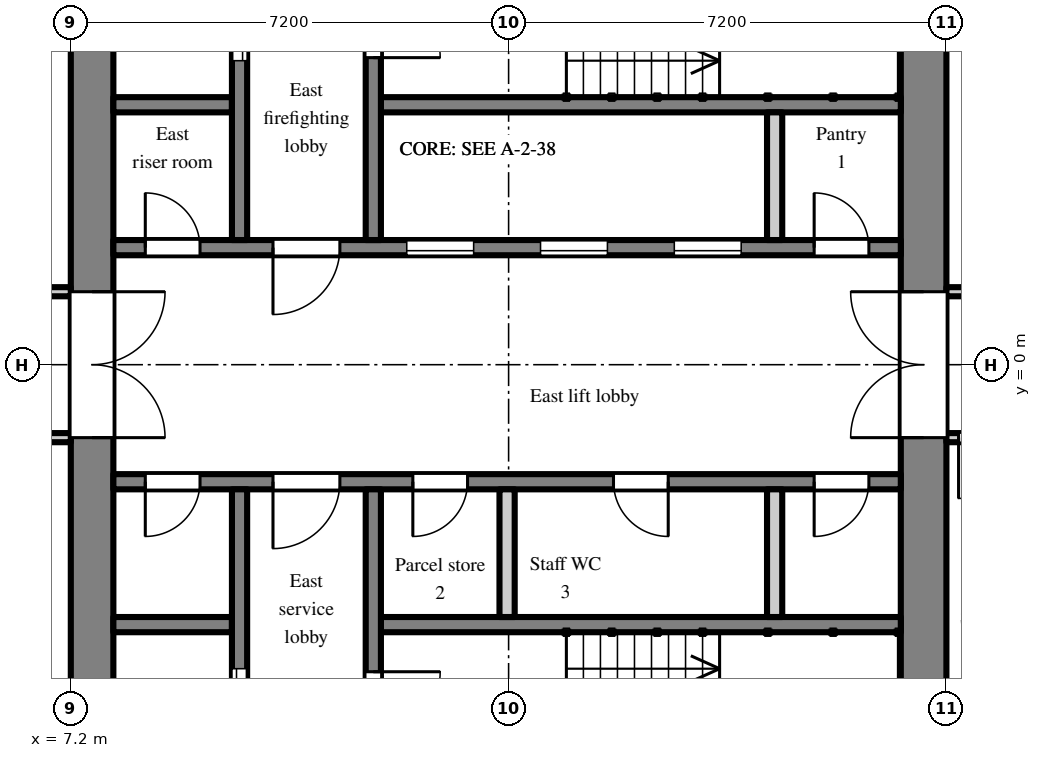
"""IFC4 building model, lengths in metres.
Left out: names, types, materials, properties, quantities, classifications, styles, units other than length and angle.
Written with IfcOpenShell. Run it as: python <this file> out.ifc"""

import sys

from ifc_helpers import new_model, si_unit, direction, frame, frame_2d, origin, place, context, subcontext, project, spatial, rectangle, extrude, element, fill, save


model = new_model("IFC4")
c1 = context("Model", 3, precision=1e-05, world=origin(), true_north=direction((0.0, 1.0)))
c2 = subcontext(c1, "Body", "Model", "MODEL_VIEW")
j1 = project(units=[si_unit("LENGTHUNIT", "METRE"), si_unit("PLANEANGLEUNIT", "RADIAN")], contexts=[c1])
p1 = place(None, origin())
s1 = spatial("IfcSite", under=j1, at=p1, CompositionType="ELEMENT")
p2 = place(p1, origin())
s2 = spatial("IfcBuilding", under=s1, at=p2, CompositionType="ELEMENT")
p3 = place(p2, frame((0.0, 0.0, 231.9)))
s3 = spatial("IfcBuildingStorey", under=s2, at=p3, CompositionType="ELEMENT", Elevation=231.9)
p4 = place(p3, frame((7.55, -7.2, 0.0), z_axis=(0.0, 0.0, 1.0), x_axis=(0.0, 1.0, 0.0)))
e1 = element("IfcWall", 1, at=p4, inside=s3, PredefinedType="SHEAR", context=c2, shape_type="SweptSolid", body=[
    extrude(rectangle(XDim=14.4, YDim=0.7, at=frame_2d((7.2, 0.0))), origin(), (0.0, 0.0, 1.0), 2.6),
])
p5 = place(p4, frame((6.0, 0.0, 0.0)))
e2 = element("IfcOpeningElement", 2, at=p5, cuts=e1, PredefinedType="OPENING", context=c2, shape_type="SweptSolid", body=[
    extrude(rectangle(XDim=2.4, YDim=2.2, at=frame_2d((1.2, 1.1))), frame((0.0, 0.36, 0.0), z_axis=(0.0, -1.0, 0.0), x_axis=(1.0, 0.0, 0.0)), (0.0, 0.0, 1.0), 0.72),
])
p6 = place(p3, frame((21.225, -7.2, 0.0), z_axis=(0.0, 0.0, 1.0), x_axis=(0.0, 1.0, 0.0)))
e3 = element("IfcWall", 3, at=p6, inside=s3, PredefinedType="SHEAR", context=c2, shape_type="SweptSolid", body=[
    extrude(rectangle(XDim=14.4, YDim=0.75, at=frame_2d((7.2, 0.0))), origin(), (0.0, 0.0, 1.0), 2.6),
])
p7 = place(p6, frame((6.0, 0.0, 0.0)))
e4 = element("IfcOpeningElement", 4, at=p7, cuts=e3, PredefinedType="OPENING", context=c2, shape_type="SweptSolid", body=[
    extrude(rectangle(XDim=2.4, YDim=2.2, at=frame_2d((1.2, 1.1))), frame((0.0, 0.385, 0.0), z_axis=(0.0, -1.0, 0.0), x_axis=(1.0, 0.0, 0.0)), (0.0, 0.0, 1.0), 0.77),
])
p8 = place(p3, frame((7.9, 1.925, 0.0), z_axis=(0.0, 0.0, 1.0), x_axis=(1.0, 0.0, 0.0)))
e5 = element("IfcWall", 5, at=p8, inside=s3, PredefinedType="SHEAR", context=c2, shape_type="SweptSolid", body=[
    extrude(rectangle(XDim=12.95, YDim=0.25, at=frame_2d((6.475, 0.0))), origin(), (0.0, 0.0, 1.0), 2.6),
])
p9 = place(p8, frame((4.825, 0.0, 0.0)))
e6 = element("IfcOpeningElement", 6, at=p9, cuts=e5, PredefinedType="OPENING", context=c2, shape_type="SweptSolid", body=[
    extrude(rectangle(XDim=1.1, YDim=2.1, at=frame_2d((0.55, 1.05))), frame((0.0, 0.135, 0.0), z_axis=(0.0, -1.0, 0.0), x_axis=(1.0, 0.0, 0.0)), (0.0, 0.0, 1.0), 0.27),
])
p10 = place(p8, frame((7.025, 0.0, 0.0)))
e7 = element("IfcOpeningElement", 7, at=p10, cuts=e5, PredefinedType="OPENING", context=c2, shape_type="SweptSolid", body=[
    extrude(rectangle(XDim=1.1, YDim=2.1, at=frame_2d((0.55, 1.05))), frame((0.0, 0.135, 0.0), z_axis=(0.0, -1.0, 0.0), x_axis=(1.0, 0.0, 0.0)), (0.0, 0.0, 1.0), 0.27),
])
p11 = place(p8, frame((9.225, 0.0, 0.0)))
e8 = element("IfcOpeningElement", 8, at=p11, cuts=e5, PredefinedType="OPENING", context=c2, shape_type="SweptSolid", body=[
    extrude(rectangle(XDim=1.1, YDim=2.1, at=frame_2d((0.55, 1.05))), frame((0.0, 0.135, 0.0), z_axis=(0.0, -1.0, 0.0), x_axis=(1.0, 0.0, 0.0)), (0.0, 0.0, 1.0), 0.27),
])
p12 = place(p8, frame((0.525, 0.0, 0.0)))
e9 = element("IfcOpeningElement", 9, at=p12, cuts=e5, PredefinedType="OPENING", context=c2, shape_type="SweptSolid", body=[
    extrude(rectangle(XDim=0.9, YDim=2.1, at=frame_2d((0.45, 1.05))), frame((0.0, 0.135, 0.0), z_axis=(0.0, -1.0, 0.0), x_axis=(1.0, 0.0, 0.0)), (0.0, 0.0, 1.0), 0.27),
])
p13 = place(p8, frame((2.625, 0.0, 0.0)))
e10 = element("IfcOpeningElement", 10, at=p13, cuts=e5, PredefinedType="OPENING", context=c2, shape_type="SweptSolid", body=[
    extrude(rectangle(XDim=1.1, YDim=2.1, at=frame_2d((0.55, 1.05))), frame((0.0, 0.135, 0.0), z_axis=(0.0, -1.0, 0.0), x_axis=(1.0, 0.0, 0.0)), (0.0, 0.0, 1.0), 0.27),
])
p14 = place(p8, frame((11.525, 0.0, 0.0)))
e11 = element("IfcOpeningElement", 11, at=p14, cuts=e5, PredefinedType="OPENING", context=c2, shape_type="SweptSolid", body=[
    extrude(rectangle(XDim=0.9, YDim=2.1, at=frame_2d((0.45, 1.05))), frame((0.0, 0.135, 0.0), z_axis=(0.0, -1.0, 0.0), x_axis=(1.0, 0.0, 0.0)), (0.0, 0.0, 1.0), 0.27),
])
p15 = place(p3, frame((7.9, 4.275, 0.0), z_axis=(0.0, 0.0, 1.0), x_axis=(1.0, 0.0, 0.0)))
e12 = element("IfcWall", 12, at=p15, inside=s3, PredefinedType="SHEAR", context=c2, shape_type="SweptSolid", body=[
    extrude(rectangle(XDim=1.95, YDim=0.25, at=frame_2d((0.975, 0.0))), origin(), (0.0, 0.0, 1.0), 2.6),
])
p16 = place(p3, frame((12.3, 4.275, 0.0), z_axis=(0.0, 0.0, 1.0), x_axis=(1.0, 0.0, 0.0)))
e13 = element("IfcWall", 13, at=p16, inside=s3, PredefinedType="SHEAR", context=c2, shape_type="SweptSolid", body=[
    extrude(rectangle(XDim=8.55, YDim=0.25, at=frame_2d((4.275, 0.0))), origin(), (0.0, 0.0, 1.0), 2.6),
])
p17 = place(p3, frame((9.975, 2.05, 0.0), z_axis=(0.0, 0.0, 1.0), x_axis=(0.0, 1.0, 0.0)))
e14 = element("IfcWall", 14, at=p17, inside=s3, PredefinedType="SHEAR", context=c2, shape_type="SweptSolid", body=[
    extrude(rectangle(XDim=4.75, YDim=0.25, at=frame_2d((2.375, 0.0))), origin(), (0.0, 0.0, 1.0), 2.6),
])
p18 = place(p17, frame((2.95, 0.0, 0.0)))
e15 = element("IfcOpeningElement", 15, at=p18, cuts=e14, PredefinedType="OPENING", context=c2, shape_type="SweptSolid", body=[
    extrude(rectangle(XDim=1.1, YDim=2.1, at=frame_2d((0.55, 1.05))), frame((0.0, 0.135, 0.0), z_axis=(0.0, -1.0, 0.0), x_axis=(1.0, 0.0, 0.0)), (0.0, 0.0, 1.0), 0.27),
])
p19 = place(p3, frame((12.175, 2.05, 0.0), z_axis=(0.0, 0.0, 1.0), x_axis=(0.0, 1.0, 0.0)))
e16 = element("IfcWall", 16, at=p19, inside=s3, PredefinedType="SHEAR", context=c2, shape_type="SweptSolid", body=[
    extrude(rectangle(XDim=4.75, YDim=0.25, at=frame_2d((2.375, 0.0))), origin(), (0.0, 0.0, 1.0), 2.6),
])
p20 = place(p19, frame((3.0, 0.0, 0.0)))
e17 = element("IfcOpeningElement", 17, at=p20, cuts=e16, PredefinedType="OPENING", context=c2, shape_type="SweptSolid", body=[
    extrude(rectangle(XDim=1.1, YDim=2.1, at=frame_2d((0.55, 1.05))), frame((0.0, 0.135, 0.0), z_axis=(0.0, -1.0, 0.0), x_axis=(1.0, 0.0, 0.0)), (0.0, 0.0, 1.0), 0.27),
])
p21 = place(p3, frame((18.775, 2.05, 0.0), z_axis=(0.0, 0.0, 1.0), x_axis=(0.0, 1.0, 0.0)))
e18 = element("IfcWall", 18, at=p21, inside=s3, PredefinedType="PARTITIONING", context=c2, shape_type="SweptSolid", body=[
    extrude(rectangle(XDim=2.1, YDim=0.25, at=frame_2d((1.05, 0.0))), origin(), (0.0, 0.0, 1.0), 2.6),
])
p22 = place(p3, frame((7.9, -1.925, 0.0), z_axis=(0.0, 0.0, 1.0), x_axis=(1.0, 0.0, 0.0)))
e19 = element("IfcWall", 19, at=p22, inside=s3, PredefinedType="SHEAR", context=c2, shape_type="SweptSolid", body=[
    extrude(rectangle(XDim=12.95, YDim=0.25, at=frame_2d((6.475, 0.0))), origin(), (0.0, 0.0, 1.0), 2.6),
])
p23 = place(p22, frame((0.525, 0.0, 0.0)))
e20 = element("IfcOpeningElement", 20, at=p23, cuts=e19, PredefinedType="OPENING", context=c2, shape_type="SweptSolid", body=[
    extrude(rectangle(XDim=0.9, YDim=2.1, at=frame_2d((0.45, 1.05))), frame((0.0, 0.135, 0.0), z_axis=(0.0, -1.0, 0.0), x_axis=(1.0, 0.0, 0.0)), (0.0, 0.0, 1.0), 0.27),
])
p24 = place(p22, frame((2.625, 0.0, 0.0)))
e21 = element("IfcOpeningElement", 21, at=p24, cuts=e19, PredefinedType="OPENING", context=c2, shape_type="SweptSolid", body=[
    extrude(rectangle(XDim=1.1, YDim=2.1, at=frame_2d((0.55, 1.05))), frame((0.0, 0.135, 0.0), z_axis=(0.0, -1.0, 0.0), x_axis=(1.0, 0.0, 0.0)), (0.0, 0.0, 1.0), 0.27),
])
p25 = place(p22, frame((4.925, 0.0, 0.0)))
e22 = element("IfcOpeningElement", 22, at=p25, cuts=e19, PredefinedType="OPENING", context=c2, shape_type="SweptSolid", body=[
    extrude(rectangle(XDim=0.9, YDim=2.1, at=frame_2d((0.45, 1.05))), frame((0.0, 0.135, 0.0), z_axis=(0.0, -1.0, 0.0), x_axis=(1.0, 0.0, 0.0)), (0.0, 0.0, 1.0), 0.27),
])
p26 = place(p22, frame((8.225, 0.0, 0.0)))
e23 = element("IfcOpeningElement", 23, at=p26, cuts=e19, PredefinedType="OPENING", context=c2, shape_type="SweptSolid", body=[
    extrude(rectangle(XDim=0.9, YDim=2.1, at=frame_2d((0.45, 1.05))), frame((0.0, 0.135, 0.0), z_axis=(0.0, -1.0, 0.0), x_axis=(1.0, 0.0, 0.0)), (0.0, 0.0, 1.0), 0.27),
])
p27 = place(p22, frame((11.525, 0.0, 0.0)))
e24 = element("IfcOpeningElement", 24, at=p27, cuts=e19, PredefinedType="OPENING", context=c2, shape_type="SweptSolid", body=[
    extrude(rectangle(XDim=0.9, YDim=2.1, at=frame_2d((0.45, 1.05))), frame((0.0, 0.135, 0.0), z_axis=(0.0, -1.0, 0.0), x_axis=(1.0, 0.0, 0.0)), (0.0, 0.0, 1.0), 0.27),
])
p28 = place(p3, frame((7.9, -4.275, 0.0), z_axis=(0.0, 0.0, 1.0), x_axis=(1.0, 0.0, 0.0)))
e25 = element("IfcWall", 25, at=p28, inside=s3, PredefinedType="SHEAR", context=c2, shape_type="SweptSolid", body=[
    extrude(rectangle(XDim=1.95, YDim=0.25, at=frame_2d((0.975, 0.0))), origin(), (0.0, 0.0, 1.0), 2.6),
])
p29 = place(p3, frame((12.3, -4.275, 0.0), z_axis=(0.0, 0.0, 1.0), x_axis=(1.0, 0.0, 0.0)))
e26 = element("IfcWall", 26, at=p29, inside=s3, PredefinedType="SHEAR", context=c2, shape_type="SweptSolid", body=[
    extrude(rectangle(XDim=8.55, YDim=0.25, at=frame_2d((4.275, 0.0))), origin(), (0.0, 0.0, 1.0), 2.6),
])
p30 = place(p3, frame((9.975, -2.05, 0.0), z_axis=(0.0, 0.0, 1.0), x_axis=(0.0, -1.0, 0.0)))
e27 = element("IfcWall", 27, at=p30, inside=s3, PredefinedType="SHEAR", context=c2, shape_type="SweptSolid", body=[
    extrude(rectangle(XDim=4.75, YDim=0.25, at=frame_2d((2.375, 0.0))), origin(), (0.0, 0.0, 1.0), 2.6),
])
p31 = place(p30, frame((2.95, 0.0, 0.0)))
e28 = element("IfcOpeningElement", 28, at=p31, cuts=e27, PredefinedType="OPENING", context=c2, shape_type="SweptSolid", body=[
    extrude(rectangle(XDim=1.1, YDim=2.1, at=frame_2d((0.55, 1.05))), frame((0.0, 0.135, 0.0), z_axis=(0.0, -1.0, 0.0), x_axis=(1.0, 0.0, 0.0)), (0.0, 0.0, 1.0), 0.27),
])
p32 = place(p3, frame((12.175, -2.05, 0.0), z_axis=(0.0, 0.0, 1.0), x_axis=(0.0, -1.0, 0.0)))
e29 = element("IfcWall", 29, at=p32, inside=s3, PredefinedType="SHEAR", context=c2, shape_type="SweptSolid", body=[
    extrude(rectangle(XDim=4.75, YDim=0.25, at=frame_2d((2.375, 0.0))), origin(), (0.0, 0.0, 1.0), 2.6),
])
p33 = place(p32, frame((3.0, 0.0, 0.0)))
e30 = element("IfcOpeningElement", 30, at=p33, cuts=e29, PredefinedType="OPENING", context=c2, shape_type="SweptSolid", body=[
    extrude(rectangle(XDim=1.1, YDim=2.1, at=frame_2d((0.55, 1.05))), frame((0.0, 0.135, 0.0), z_axis=(0.0, -1.0, 0.0), x_axis=(1.0, 0.0, 0.0)), (0.0, 0.0, 1.0), 0.27),
])
for number, where, z_axis, x_axis in (
    (31, (14.375, -2.05, 0.0), (0.0, 0.0, 1.0), (0.0, -1.0, 0.0)),
    (32, (18.775, -2.05, 0.0), (0.0, 0.0, 1.0), (0.0, -1.0, 0.0)),
):
    element("IfcWall", number, at=place(p3, frame(where, z_axis=z_axis, x_axis=x_axis)), inside=s3, PredefinedType="PARTITIONING", context=c2, shape_type="SweptSolid", body=[
        extrude(rectangle(XDim=2.1, YDim=0.25, at=frame_2d((1.05, 0.0))), origin(), (0.0, 0.0, 1.0), 2.6),
    ])
p34 = place(p3, frame((1.275, -1.2, 0.0), z_axis=(0.0, 0.0, 1.0), x_axis=(1.0, 0.0, 0.0)))
e33 = element("IfcWall", 33, at=p34, inside=s3, PredefinedType="PARTITIONING", context=c2, shape_type="SweptSolid", body=[
    extrude(rectangle(XDim=5.925, YDim=0.15, at=frame_2d((2.962, 0.0))), origin(), (0.0, 0.0, 1.0), 2.6),
])
p35 = place(p34, frame((3.975, 0.0, 0.0)))
e34 = element("IfcOpeningElement", 34, at=p35, cuts=e33, PredefinedType="OPENING", context=c2, shape_type="SweptSolid", body=[
    extrude(rectangle(XDim=0.9, YDim=2.1, at=frame_2d((0.45, 1.05))), frame((0.0, 0.085, 0.0), z_axis=(0.0, -1.0, 0.0), x_axis=(1.0, 0.0, 0.0)), (0.0, 0.0, 1.0), 0.17),
])
p36 = place(p3, frame((1.275, 1.2, 0.0), z_axis=(0.0, 0.0, 1.0), x_axis=(1.0, 0.0, 0.0)))
e35 = element("IfcWall", 35, at=p36, inside=s3, PredefinedType="PARTITIONING", context=c2, shape_type="SweptSolid", body=[
    extrude(rectangle(XDim=5.925, YDim=0.15, at=frame_2d((2.962, 0.0))), origin(), (0.0, 0.0, 1.0), 2.6),
])
p37 = place(p36, frame((4.475, 0.0, 0.0)))
e36 = element("IfcOpeningElement", 36, at=p37, cuts=e35, PredefinedType="OPENING", context=c2, shape_type="SweptSolid", body=[
    extrude(rectangle(XDim=0.9, YDim=2.1, at=frame_2d((0.45, 1.05))), frame((0.0, 0.085, 0.0), z_axis=(0.0, -1.0, 0.0), x_axis=(1.0, 0.0, 0.0)), (0.0, 0.0, 1.0), 0.17),
])
p38 = place(p3, frame((21.6, -1.2, 0.0), z_axis=(0.0, 0.0, 1.0), x_axis=(1.0, 0.0, 0.0)))
e37 = element("IfcWall", 37, at=p38, inside=s3, PredefinedType="PARTITIONING", context=c2, shape_type="SweptSolid", body=[
    extrude(rectangle(XDim=5.125, YDim=0.15, at=frame_2d((2.562, 0.0))), origin(), (0.0, 0.0, 1.0), 2.6),
])
p39 = place(p38, frame((0.2, 0.0, 0.0)))
e38 = element("IfcOpeningElement", 38, at=p39, cuts=e37, PredefinedType="OPENING", context=c2, shape_type="SweptSolid", body=[
    extrude(rectangle(XDim=1.0, YDim=2.1, at=frame_2d((0.5, 1.05))), frame((0.0, 0.085, 0.0), z_axis=(0.0, -1.0, 0.0), x_axis=(1.0, 0.0, 0.0)), (0.0, 0.0, 1.0), 0.17),
])
p40 = place(p3, frame((21.6, 1.2, 0.0), z_axis=(0.0, 0.0, 1.0), x_axis=(1.0, 0.0, 0.0)))
e39 = element("IfcWall", 39, at=p40, inside=s3, PredefinedType="PARTITIONING", context=c2, shape_type="SweptSolid", body=[
    extrude(rectangle(XDim=5.125, YDim=0.15, at=frame_2d((2.562, 0.0))), origin(), (0.0, 0.0, 1.0), 2.6),
])
p41 = place(p40, frame((0.6, 0.0, 0.0)))
e40 = element("IfcOpeningElement", 40, at=p41, cuts=e39, PredefinedType="OPENING", context=c2, shape_type="SweptSolid", body=[
    extrude(rectangle(XDim=1.0, YDim=2.1, at=frame_2d((0.5, 1.05))), frame((0.0, 0.085, 0.0), z_axis=(0.0, -1.0, 0.0), x_axis=(1.0, 0.0, 0.0)), (0.0, 0.0, 1.0), 0.17),
])
p42 = place(p40, frame((3.95, 0.0, 0.0)))
e41 = element("IfcOpeningElement", 41, at=p42, cuts=e39, PredefinedType="OPENING", context=c2, shape_type="SweptSolid", body=[
    extrude(rectangle(XDim=0.9, YDim=2.1, at=frame_2d((0.45, 1.05))), frame((0.0, 0.085, 0.0), z_axis=(0.0, -1.0, 0.0), x_axis=(1.0, 0.0, 0.0)), (0.0, 0.0, 1.0), 0.17),
])
p43 = place(p9, origin())
e42 = element("IfcDoor", 42, at=p43, inside=s3, OperationType="SLIDING_TO_LEFT", PredefinedType="DOOR", context=c2, shape_type="SweptSolid", body=[
    extrude(rectangle(XDim=1.1, YDim=2.1, at=frame_2d((0.55, 1.05))), frame((0.0, 0.025, 0.0), z_axis=(0.0, -1.0, 0.0), x_axis=(1.0, 0.0, 0.0)), (0.0, 0.0, 1.0), 0.05),
])
fill(e6, e42)
p44 = place(p10, origin())
e43 = element("IfcDoor", 43, at=p44, inside=s3, OperationType="SLIDING_TO_LEFT", PredefinedType="DOOR", context=c2, shape_type="SweptSolid", body=[
    extrude(rectangle(XDim=1.1, YDim=2.1, at=frame_2d((0.55, 1.05))), frame((0.0, 0.025, 0.0), z_axis=(0.0, -1.0, 0.0), x_axis=(1.0, 0.0, 0.0)), (0.0, 0.0, 1.0), 0.05),
])
fill(e7, e43)
p45 = place(p11, origin())
e44 = element("IfcDoor", 44, at=p45, inside=s3, OperationType="SLIDING_TO_LEFT", PredefinedType="DOOR", context=c2, shape_type="SweptSolid", body=[
    extrude(rectangle(XDim=1.1, YDim=2.1, at=frame_2d((0.55, 1.05))), frame((0.0, 0.025, 0.0), z_axis=(0.0, -1.0, 0.0), x_axis=(1.0, 0.0, 0.0)), (0.0, 0.0, 1.0), 0.05),
])
fill(e8, e44)
p46 = place(p18, origin())
e45 = element("IfcDoor", 45, at=p46, inside=s3, OperationType="SLIDING_TO_LEFT", PredefinedType="DOOR", context=c2, shape_type="SweptSolid", body=[
    extrude(rectangle(XDim=1.1, YDim=2.1, at=frame_2d((0.55, 1.05))), frame((0.0, 0.025, 0.0), z_axis=(0.0, -1.0, 0.0), x_axis=(1.0, 0.0, 0.0)), (0.0, 0.0, 1.0), 0.05),
])
fill(e15, e45)
p47 = place(p31, origin())
e46 = element("IfcDoor", 46, at=p47, inside=s3, OperationType="SLIDING_TO_LEFT", PredefinedType="DOOR", context=c2, shape_type="SweptSolid", body=[
    extrude(rectangle(XDim=1.1, YDim=2.1, at=frame_2d((0.55, 1.05))), frame((0.0, 0.025, 0.0), z_axis=(0.0, -1.0, 0.0), x_axis=(1.0, 0.0, 0.0)), (0.0, 0.0, 1.0), 0.05),
])
fill(e28, e46)
p48 = place(p20, frame((1.1, 0.0, 0.0), z_axis=(0.0, 0.0, 1.0), x_axis=(-1.0, 0.0, 0.0)))
e47 = element("IfcDoor", 47, at=p48, inside=s3, OperationType="SINGLE_SWING_RIGHT", PredefinedType="DOOR", context=c2, shape_type="SweptSolid", body=[
    extrude(rectangle(XDim=1.1, YDim=2.1, at=frame_2d((0.55, 1.05))), frame((0.0, 0.025, 0.0), z_axis=(0.0, -1.0, 0.0), x_axis=(1.0, 0.0, 0.0)), (0.0, 0.0, 1.0), 0.05),
])
fill(e17, e47)
p49 = place(p33, origin())
e48 = element("IfcDoor", 48, at=p49, inside=s3, OperationType="SINGLE_SWING_LEFT", PredefinedType="DOOR", context=c2, shape_type="SweptSolid", body=[
    extrude(rectangle(XDim=1.1, YDim=2.1, at=frame_2d((0.55, 1.05))), frame((0.0, 0.025, 0.0), z_axis=(0.0, -1.0, 0.0), x_axis=(1.0, 0.0, 0.0)), (0.0, 0.0, 1.0), 0.05),
])
fill(e30, e48)
p50 = place(p12, origin())
e49 = element("IfcDoor", 49, at=p50, inside=s3, OperationType="SINGLE_SWING_LEFT", PredefinedType="DOOR", context=c2, shape_type="SweptSolid", body=[
    extrude(rectangle(XDim=0.9, YDim=2.1, at=frame_2d((0.45, 1.05))), frame((0.0, 0.025, 0.0), z_axis=(0.0, -1.0, 0.0), x_axis=(1.0, 0.0, 0.0)), (0.0, 0.0, 1.0), 0.05),
])
fill(e9, e49)
p51 = place(p23, frame((0.9, 0.0, 0.0), z_axis=(0.0, 0.0, 1.0), x_axis=(-1.0, 0.0, 0.0)))
e50 = element("IfcDoor", 50, at=p51, inside=s3, OperationType="SINGLE_SWING_RIGHT", PredefinedType="DOOR", context=c2, shape_type="SweptSolid", body=[
    extrude(rectangle(XDim=0.9, YDim=2.1, at=frame_2d((0.45, 1.05))), frame((0.0, 0.025, 0.0), z_axis=(0.0, -1.0, 0.0), x_axis=(1.0, 0.0, 0.0)), (0.0, 0.0, 1.0), 0.05),
])
fill(e20, e50)
p52 = place(p13, frame((1.1, 0.0, 0.0), z_axis=(0.0, 0.0, 1.0), x_axis=(-1.0, 0.0, 0.0)))
e51 = element("IfcDoor", 51, at=p52, inside=s3, OperationType="SINGLE_SWING_RIGHT", PredefinedType="DOOR", context=c2, shape_type="SweptSolid", body=[
    extrude(rectangle(XDim=1.1, YDim=2.1, at=frame_2d((0.55, 1.05))), frame((0.0, 0.025, 0.0), z_axis=(0.0, -1.0, 0.0), x_axis=(1.0, 0.0, 0.0)), (0.0, 0.0, 1.0), 0.05),
])
fill(e10, e51)
p53 = place(p24, frame((1.1, 0.0, 0.0), z_axis=(0.0, 0.0, 1.0), x_axis=(-1.0, 0.0, 0.0)))
e52 = element("IfcDoor", 52, at=p53, inside=s3, OperationType="SINGLE_SWING_RIGHT", PredefinedType="DOOR", context=c2, shape_type="SweptSolid", body=[
    extrude(rectangle(XDim=1.1, YDim=2.1, at=frame_2d((0.55, 1.05))), frame((0.0, 0.025, 0.0), z_axis=(0.0, -1.0, 0.0), x_axis=(1.0, 0.0, 0.0)), (0.0, 0.0, 1.0), 0.05),
])
fill(e21, e52)
p54 = place(p5, frame((2.4, 0.0, 0.0), z_axis=(0.0, 0.0, 1.0), x_axis=(-1.0, 0.0, 0.0)))
e53 = element("IfcDoor", 53, at=p54, inside=s3, OperationType="DOUBLE_DOOR_DOUBLE_SWING", PredefinedType="DOOR", context=c2, shape_type="SweptSolid", body=[
    extrude(rectangle(XDim=2.4, YDim=2.2, at=frame_2d((1.2, 1.1))), frame((0.0, 0.025, 0.0), z_axis=(0.0, -1.0, 0.0), x_axis=(1.0, 0.0, 0.0)), (0.0, 0.0, 1.0), 0.05),
])
fill(e2, e53)
p55 = place(p7, origin())
e54 = element("IfcDoor", 54, at=p55, inside=s3, OperationType="DOUBLE_DOOR_DOUBLE_SWING", PredefinedType="DOOR", context=c2, shape_type="SweptSolid", body=[
    extrude(rectangle(XDim=2.4, YDim=2.2, at=frame_2d((1.2, 1.1))), frame((0.0, 0.025, 0.0), z_axis=(0.0, -1.0, 0.0), x_axis=(1.0, 0.0, 0.0)), (0.0, 0.0, 1.0), 0.05),
])
fill(e4, e54)
p56 = place(p14, origin())
e55 = element("IfcDoor", 55, at=p56, inside=s3, OperationType="SINGLE_SWING_LEFT", PredefinedType="DOOR", context=c2, shape_type="SweptSolid", body=[
    extrude(rectangle(XDim=0.9, YDim=2.1, at=frame_2d((0.45, 1.05))), frame((0.0, 0.025, 0.0), z_axis=(0.0, -1.0, 0.0), x_axis=(1.0, 0.0, 0.0)), (0.0, 0.0, 1.0), 0.05),
])
fill(e11, e55)
p57 = place(p25, frame((0.9, 0.0, 0.0), z_axis=(0.0, 0.0, 1.0), x_axis=(-1.0, 0.0, 0.0)))
e56 = element("IfcDoor", 56, at=p57, inside=s3, OperationType="SINGLE_SWING_RIGHT", PredefinedType="DOOR", context=c2, shape_type="SweptSolid", body=[
    extrude(rectangle(XDim=0.9, YDim=2.1, at=frame_2d((0.45, 1.05))), frame((0.0, 0.025, 0.0), z_axis=(0.0, -1.0, 0.0), x_axis=(1.0, 0.0, 0.0)), (0.0, 0.0, 1.0), 0.05),
])
fill(e22, e56)
p58 = place(p26, frame((0.9, 0.0, 0.0), z_axis=(0.0, 0.0, 1.0), x_axis=(-1.0, 0.0, 0.0)))
e57 = element("IfcDoor", 57, at=p58, inside=s3, OperationType="SINGLE_SWING_LEFT", PredefinedType="DOOR", context=c2, shape_type="SweptSolid", body=[
    extrude(rectangle(XDim=0.9, YDim=2.1, at=frame_2d((0.45, 1.05))), frame((0.0, 0.025, 0.0), z_axis=(0.0, -1.0, 0.0), x_axis=(1.0, 0.0, 0.0)), (0.0, 0.0, 1.0), 0.05),
])
fill(e23, e57)
p59 = place(p27, frame((0.9, 0.0, 0.0), z_axis=(0.0, 0.0, 1.0), x_axis=(-1.0, 0.0, 0.0)))
e58 = element("IfcDoor", 58, at=p59, inside=s3, OperationType="SINGLE_SWING_RIGHT", PredefinedType="DOOR", context=c2, shape_type="SweptSolid", body=[
    extrude(rectangle(XDim=0.9, YDim=2.1, at=frame_2d((0.45, 1.05))), frame((0.0, 0.025, 0.0), z_axis=(0.0, -1.0, 0.0), x_axis=(1.0, 0.0, 0.0)), (0.0, 0.0, 1.0), 0.05),
])
fill(e24, e58)
p60 = place(p39, frame((1.0, 0.0, 0.0), z_axis=(0.0, 0.0, 1.0), x_axis=(-1.0, 0.0, 0.0)))
e59 = element("IfcDoor", 59, at=p60, inside=s3, OperationType="SINGLE_SWING_RIGHT", PredefinedType="DOOR", context=c2, shape_type="SweptSolid", body=[
    extrude(rectangle(XDim=1.0, YDim=2.1, at=frame_2d((0.5, 1.05))), frame((0.0, 0.025, 0.0), z_axis=(0.0, -1.0, 0.0), x_axis=(1.0, 0.0, 0.0)), (0.0, 0.0, 1.0), 0.05),
])
fill(e38, e59)
save(model, sys.argv[1])
